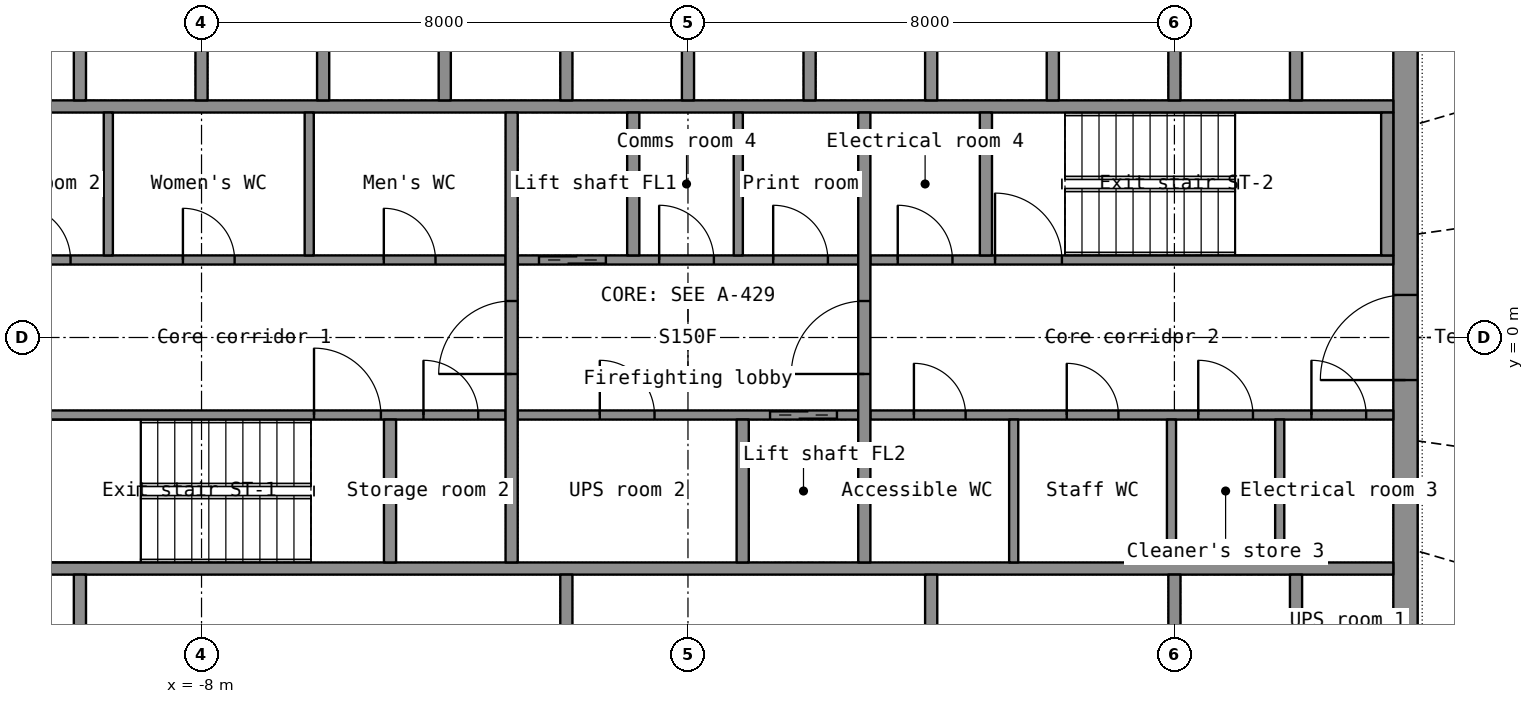
"""IFC4 building model, lengths in metres.
Left out: names, types, materials, properties, quantities, classifications, styles, units other than length and angle.
Written with IfcOpenShell. Run it as: python <this file> out.ifc"""

import sys

from ifc_helpers import new_model, si_unit, direction, frame, frame_2d, origin, place, context, subcontext, project, spatial, rectangle, extrude, element, fill, save


model = new_model("IFC4")
c1 = context("Model", 3, precision=1e-05, world=origin(), true_north=direction((0.0, 1.0)))
c2 = subcontext(c1, "Body", "Model", "MODEL_VIEW")
j1 = project(units=[si_unit("LENGTHUNIT", "METRE"), si_unit("PLANEANGLEUNIT", "RADIAN")], contexts=[c1])
p1 = place(None, origin())
s1 = spatial("IfcSite", under=j1, at=p1, CompositionType="ELEMENT")
p2 = place(p1, origin())
s2 = spatial("IfcBuilding", under=s1, at=p2, CompositionType="ELEMENT")
p3 = place(p2, frame((0.0, 0.0, 224.5)))
s3 = spatial("IfcBuildingStorey", under=s2, at=p3, CompositionType="ELEMENT", Elevation=224.5)
p4 = place(p3, frame((11.8, -7.2, 0.0), z_axis=(0.0, 0.0, 1.0), x_axis=(0.0, 1.0, 0.0)))
e1 = element("IfcWall", 1, at=p4, inside=s3, PredefinedType="SHEAR", context=c2, shape_type="SweptSolid", body=[
    extrude(rectangle(XDim=14.4, YDim=0.4, at=frame_2d((7.2, 0.0))), origin(), (0.0, 0.0, 1.0), 3.3),
])
p5 = place(p4, frame((6.5, 0.0, 0.0)))
e2 = element("IfcOpeningElement", 2, at=p5, cuts=e1, PredefinedType="OPENING", context=c2, shape_type="SweptSolid", body=[
    extrude(rectangle(XDim=1.4, YDim=2.2, at=frame_2d((0.7, 1.1))), frame((0.0, 0.21, 0.0), z_axis=(0.0, -1.0, 0.0), x_axis=(1.0, 0.0, 0.0)), (0.0, 0.0, 1.0), 0.42),
])
for number, where, z_axis, x_axis in (
    (3, (-11.6, -3.8, 0.0), (0.0, 0.0, 1.0), (1.0, 0.0, 0.0)),
    (4, (-11.6, 3.8, 0.0), (0.0, 0.0, 1.0), (1.0, 0.0, 0.0)),
):
    element("IfcWall", number, at=place(p3, frame(where, z_axis=z_axis, x_axis=x_axis)), inside=s3, PredefinedType="SHEAR", context=c2, shape_type="SweptSolid", body=[
        extrude(rectangle(XDim=23.2, YDim=0.2, at=frame_2d((11.6, 0.0))), origin(), (0.0, 0.0, 1.0), 3.3),
    ])
for number, where, z_axis, x_axis in (
    (5, (-10.0, -6.8, 0.0), (0.0, 0.0, 1.0), (0.0, 1.0, 0.0)),
    (6, (8.0, -6.8, 0.0), (0.0, 0.0, 1.0), (0.0, 1.0, 0.0)),
    (7, (10.0, -6.8, 0.0), (0.0, 0.0, 1.0), (0.0, 1.0, 0.0)),
):
    element("IfcWall", number, at=place(p3, frame(where, z_axis=z_axis, x_axis=x_axis)), inside=s3, PredefinedType="SHEAR", context=c2, shape_type="SweptSolid", body=[
        extrude(rectangle(XDim=2.9, YDim=0.2, at=frame_2d((1.45, 0.0))), origin(), (0.0, 0.0, 1.0), 3.3),
    ])
for number, where, z_axis, x_axis in (
    (8, (-2.0, -6.8, 0.0), (0.0, 0.0, 1.0), (0.0, 1.0, 0.0)),
    (9, (4.0, -6.8, 0.0), (0.0, 0.0, 1.0), (0.0, 1.0, 0.0)),
):
    element("IfcWall", number, at=place(p3, frame(where, z_axis=z_axis, x_axis=x_axis)), inside=s3, PredefinedType="PARTITIONING", context=c2, shape_type="SweptSolid", body=[
        extrude(rectangle(XDim=2.9, YDim=0.2, at=frame_2d((1.45, 0.0))), origin(), (0.0, 0.0, 1.0), 3.3),
    ])
for number, where, z_axis, x_axis in (
    (10, (-10.0, 3.9, 0.0), (0.0, 0.0, 1.0), (0.0, 1.0, 0.0)),
    (11, (-8.0, 3.9, 0.0), (0.0, 0.0, 1.0), (0.0, 1.0, 0.0)),
    (12, (-6.0, 3.9, 0.0), (0.0, 0.0, 1.0), (0.0, 1.0, 0.0)),
    (13, (-4.0, 3.9, 0.0), (0.0, 0.0, 1.0), (0.0, 1.0, 0.0)),
    (14, (-2.0, 3.9, 0.0), (0.0, 0.0, 1.0), (0.0, 1.0, 0.0)),
    (15, (0.0, 3.9, 0.0), (0.0, 0.0, 1.0), (0.0, 1.0, 0.0)),
    (16, (2.0, 3.9, 0.0), (0.0, 0.0, 1.0), (0.0, 1.0, 0.0)),
    (17, (4.0, 3.9, 0.0), (0.0, 0.0, 1.0), (0.0, 1.0, 0.0)),
    (18, (6.0, 3.9, 0.0), (0.0, 0.0, 1.0), (0.0, 1.0, 0.0)),
    (19, (8.0, 3.9, 0.0), (0.0, 0.0, 1.0), (0.0, 1.0, 0.0)),
    (20, (10.0, 3.9, 0.0), (0.0, 0.0, 1.0), (0.0, 1.0, 0.0)),
):
    element("IfcWall", number, at=place(p3, frame(where, z_axis=z_axis, x_axis=x_axis)), inside=s3, PredefinedType="SHEAR", context=c2, shape_type="SweptSolid", body=[
        extrude(rectangle(XDim=2.9, YDim=0.2, at=frame_2d((1.45, 0.0))), origin(), (0.0, 0.0, 1.0), 3.3),
    ])
p6 = place(p3, frame((-11.6, -1.275, 0.0), z_axis=(0.0, 0.0, 1.0), x_axis=(1.0, 0.0, 0.0)))
e21 = element("IfcWall", 21, at=p6, inside=s3, PredefinedType="SHEAR", context=c2, shape_type="SweptSolid", body=[
    extrude(rectangle(XDim=8.6, YDim=0.15, at=frame_2d((4.3, 0.0))), origin(), (0.0, 0.0, 1.0), 3.3),
])
p7 = place(p6, frame((5.45, 0.0, 0.0)))
e22 = element("IfcOpeningElement", 22, at=p7, cuts=e21, PredefinedType="OPENING", context=c2, shape_type="SweptSolid", body=[
    extrude(rectangle(XDim=1.1, YDim=2.15, at=frame_2d((0.55, 1.075))), frame((0.0, 0.085, 0.0), z_axis=(0.0, -1.0, 0.0), x_axis=(1.0, 0.0, 0.0)), (0.0, 0.0, 1.0), 0.17),
])
p8 = place(p6, frame((7.25, 0.0, 0.0)))
e23 = element("IfcOpeningElement", 23, at=p8, cuts=e21, PredefinedType="OPENING", context=c2, shape_type="SweptSolid", body=[
    extrude(rectangle(XDim=0.9, YDim=2.1, at=frame_2d((0.45, 1.05))), frame((0.0, 0.085, 0.0), z_axis=(0.0, -1.0, 0.0), x_axis=(1.0, 0.0, 0.0)), (0.0, 0.0, 1.0), 0.17),
])
p9 = place(p3, frame((-2.8, -1.275, 0.0), z_axis=(0.0, 0.0, 1.0), x_axis=(1.0, 0.0, 0.0)))
e24 = element("IfcWall", 24, at=p9, inside=s3, PredefinedType="SHEAR", context=c2, shape_type="SweptSolid", body=[
    extrude(rectangle(XDim=5.6, YDim=0.15, at=frame_2d((2.8, 0.0))), origin(), (0.0, 0.0, 1.0), 3.3),
])
p10 = place(p9, frame((4.15, 0.0, 0.0)))
e25 = element("IfcOpeningElement", 25, at=p10, cuts=e24, PredefinedType="OPENING", context=c2, shape_type="SweptSolid", body=[
    extrude(rectangle(XDim=1.1, YDim=2.2, at=frame_2d((0.55, 1.1))), frame((0.0, 0.085, 0.0), z_axis=(0.0, -1.0, 0.0), x_axis=(1.0, 0.0, 0.0)), (0.0, 0.0, 1.0), 0.17),
])
p11 = place(p9, frame((1.35, 0.0, 0.0)))
e26 = element("IfcOpeningElement", 26, at=p11, cuts=e24, PredefinedType="OPENING", context=c2, shape_type="SweptSolid", body=[
    extrude(rectangle(XDim=0.9, YDim=2.1, at=frame_2d((0.45, 1.05))), frame((0.0, 0.085, 0.0), z_axis=(0.0, -1.0, 0.0), x_axis=(1.0, 0.0, 0.0)), (0.0, 0.0, 1.0), 0.17),
])
p12 = place(p3, frame((3.0, -1.275, 0.0), z_axis=(0.0, 0.0, 1.0), x_axis=(1.0, 0.0, 0.0)))
e27 = element("IfcWall", 27, at=p12, inside=s3, PredefinedType="PARTITIONING", context=c2, shape_type="SweptSolid", body=[
    extrude(rectangle(XDim=8.6, YDim=0.15, at=frame_2d((4.3, 0.0))), origin(), (0.0, 0.0, 1.0), 3.3),
])
p13 = place(p12, frame((0.716, 0.0, 0.0)))
e28 = element("IfcOpeningElement", 28, at=p13, cuts=e27, PredefinedType="OPENING", context=c2, shape_type="SweptSolid", body=[
    extrude(rectangle(XDim=0.85, YDim=2.1, at=frame_2d((0.425, 1.05))), frame((0.0, 0.085, 0.0), z_axis=(0.0, -1.0, 0.0), x_axis=(1.0, 0.0, 0.0)), (0.0, 0.0, 1.0), 0.17),
])
p14 = place(p12, frame((3.229, 0.0, 0.0)))
e29 = element("IfcOpeningElement", 29, at=p14, cuts=e27, PredefinedType="OPENING", context=c2, shape_type="SweptSolid", body=[
    extrude(rectangle(XDim=0.85, YDim=2.1, at=frame_2d((0.425, 1.05))), frame((0.0, 0.085, 0.0), z_axis=(0.0, -1.0, 0.0), x_axis=(1.0, 0.0, 0.0)), (0.0, 0.0, 1.0), 0.17),
])
p15 = place(p12, frame((5.392, 0.0, 0.0)))
e30 = element("IfcOpeningElement", 30, at=p15, cuts=e27, PredefinedType="OPENING", context=c2, shape_type="SweptSolid", body=[
    extrude(rectangle(XDim=0.9, YDim=2.1, at=frame_2d((0.45, 1.05))), frame((0.0, 0.085, 0.0), z_axis=(0.0, -1.0, 0.0), x_axis=(1.0, 0.0, 0.0)), (0.0, 0.0, 1.0), 0.17),
])
p16 = place(p12, frame((7.253, 0.0, 0.0)))
e31 = element("IfcOpeningElement", 31, at=p16, cuts=e27, PredefinedType="OPENING", context=c2, shape_type="SweptSolid", body=[
    extrude(rectangle(XDim=0.9, YDim=2.1, at=frame_2d((0.45, 1.05))), frame((0.0, 0.085, 0.0), z_axis=(0.0, -1.0, 0.0), x_axis=(1.0, 0.0, 0.0)), (0.0, 0.0, 1.0), 0.17),
])
p17 = place(p3, frame((-11.6, 1.275, 0.0), z_axis=(0.0, 0.0, 1.0), x_axis=(1.0, 0.0, 0.0)))
e32 = element("IfcWall", 32, at=p17, inside=s3, PredefinedType="PARTITIONING", context=c2, shape_type="SweptSolid", body=[
    extrude(rectangle(XDim=8.6, YDim=0.15, at=frame_2d((4.3, 0.0))), origin(), (0.0, 0.0, 1.0), 3.3),
])
p18 = place(p17, frame((0.546, 0.0, 0.0)))
e33 = element("IfcOpeningElement", 33, at=p18, cuts=e32, PredefinedType="OPENING", context=c2, shape_type="SweptSolid", body=[
    extrude(rectangle(XDim=0.9, YDim=2.1, at=frame_2d((0.45, 1.05))), frame((0.0, 0.085, 0.0), z_axis=(0.0, -1.0, 0.0), x_axis=(1.0, 0.0, 0.0)), (0.0, 0.0, 1.0), 0.17),
])
p19 = place(p17, frame((3.294, 0.0, 0.0)))
e34 = element("IfcOpeningElement", 34, at=p19, cuts=e32, PredefinedType="OPENING", context=c2, shape_type="SweptSolid", body=[
    extrude(rectangle(XDim=0.85, YDim=2.1, at=frame_2d((0.425, 1.05))), frame((0.0, 0.085, 0.0), z_axis=(0.0, -1.0, 0.0), x_axis=(1.0, 0.0, 0.0)), (0.0, 0.0, 1.0), 0.17),
])
p20 = place(p17, frame((6.598, 0.0, 0.0)))
e35 = element("IfcOpeningElement", 35, at=p20, cuts=e32, PredefinedType="OPENING", context=c2, shape_type="SweptSolid", body=[
    extrude(rectangle(XDim=0.85, YDim=2.1, at=frame_2d((0.425, 1.05))), frame((0.0, 0.085, 0.0), z_axis=(0.0, -1.0, 0.0), x_axis=(1.0, 0.0, 0.0)), (0.0, 0.0, 1.0), 0.17),
])
p21 = place(p3, frame((-2.8, 1.275, 0.0), z_axis=(0.0, 0.0, 1.0), x_axis=(1.0, 0.0, 0.0)))
e36 = element("IfcWall", 36, at=p21, inside=s3, PredefinedType="SHEAR", context=c2, shape_type="SweptSolid", body=[
    extrude(rectangle(XDim=5.6, YDim=0.15, at=frame_2d((2.8, 0.0))), origin(), (0.0, 0.0, 1.0), 3.3),
])
p22 = place(p21, frame((0.35, 0.0, 0.0)))
e37 = element("IfcOpeningElement", 37, at=p22, cuts=e36, PredefinedType="OPENING", context=c2, shape_type="SweptSolid", body=[
    extrude(rectangle(XDim=1.1, YDim=2.2, at=frame_2d((0.55, 1.1))), frame((0.0, 0.085, 0.0), z_axis=(0.0, -1.0, 0.0), x_axis=(1.0, 0.0, 0.0)), (0.0, 0.0, 1.0), 0.17),
])
p23 = place(p21, frame((2.326, 0.0, 0.0)))
e38 = element("IfcOpeningElement", 38, at=p23, cuts=e36, PredefinedType="OPENING", context=c2, shape_type="SweptSolid", body=[
    extrude(rectangle(XDim=0.9, YDim=2.1, at=frame_2d((0.45, 1.05))), frame((0.0, 0.085, 0.0), z_axis=(0.0, -1.0, 0.0), x_axis=(1.0, 0.0, 0.0)), (0.0, 0.0, 1.0), 0.17),
])
p24 = place(p21, frame((4.201, 0.0, 0.0)))
e39 = element("IfcOpeningElement", 39, at=p24, cuts=e36, PredefinedType="OPENING", context=c2, shape_type="SweptSolid", body=[
    extrude(rectangle(XDim=0.9, YDim=2.1, at=frame_2d((0.45, 1.05))), frame((0.0, 0.085, 0.0), z_axis=(0.0, -1.0, 0.0), x_axis=(1.0, 0.0, 0.0)), (0.0, 0.0, 1.0), 0.17),
])
p25 = place(p3, frame((3.0, 1.275, 0.0), z_axis=(0.0, 0.0, 1.0), x_axis=(1.0, 0.0, 0.0)))
e40 = element("IfcWall", 40, at=p25, inside=s3, PredefinedType="SHEAR", context=c2, shape_type="SweptSolid", body=[
    extrude(rectangle(XDim=8.6, YDim=0.15, at=frame_2d((4.3, 0.0))), origin(), (0.0, 0.0, 1.0), 3.3),
])
p26 = place(p25, frame((2.05, 0.0, 0.0)))
e41 = element("IfcOpeningElement", 41, at=p26, cuts=e40, PredefinedType="OPENING", context=c2, shape_type="SweptSolid", body=[
    extrude(rectangle(XDim=1.1, YDim=2.15, at=frame_2d((0.55, 1.075))), frame((0.0, 0.085, 0.0), z_axis=(0.0, -1.0, 0.0), x_axis=(1.0, 0.0, 0.0)), (0.0, 0.0, 1.0), 0.17),
])
p27 = place(p25, frame((0.45, 0.0, 0.0)))
e42 = element("IfcOpeningElement", 42, at=p27, cuts=e40, PredefinedType="OPENING", context=c2, shape_type="SweptSolid", body=[
    extrude(rectangle(XDim=0.9, YDim=2.1, at=frame_2d((0.45, 1.05))), frame((0.0, 0.085, 0.0), z_axis=(0.0, -1.0, 0.0), x_axis=(1.0, 0.0, 0.0)), (0.0, 0.0, 1.0), 0.17),
])
p28 = place(p3, frame((-2.9, -3.7, 0.0), z_axis=(0.0, 0.0, 1.0), x_axis=(0.0, 1.0, 0.0)))
e43 = element("IfcWall", 43, at=p28, inside=s3, PredefinedType="SHEAR", context=c2, shape_type="SweptSolid", body=[
    extrude(rectangle(XDim=7.4, YDim=0.2, at=frame_2d((3.7, 0.0))), origin(), (0.0, 0.0, 1.0), 3.3),
])
p29 = place(p28, frame((3.1, 0.0, 0.0)))
e44 = element("IfcOpeningElement", 44, at=p29, cuts=e43, PredefinedType="OPENING", context=c2, shape_type="SweptSolid", body=[
    extrude(rectangle(XDim=1.2, YDim=2.2, at=frame_2d((0.6, 1.1))), frame((0.0, 0.11, 0.0), z_axis=(0.0, -1.0, 0.0), x_axis=(1.0, 0.0, 0.0)), (0.0, 0.0, 1.0), 0.22),
])
p30 = place(p3, frame((2.9, -3.7, 0.0), z_axis=(0.0, 0.0, 1.0), x_axis=(0.0, 1.0, 0.0)))
e45 = element("IfcWall", 45, at=p30, inside=s3, PredefinedType="SHEAR", context=c2, shape_type="SweptSolid", body=[
    extrude(rectangle(XDim=7.4, YDim=0.2, at=frame_2d((3.7, 0.0))), origin(), (0.0, 0.0, 1.0), 3.3),
])
p31 = place(p30, frame((3.1, 0.0, 0.0)))
e46 = element("IfcOpeningElement", 46, at=p31, cuts=e45, PredefinedType="OPENING", context=c2, shape_type="SweptSolid", body=[
    extrude(rectangle(XDim=1.2, YDim=2.2, at=frame_2d((0.6, 1.1))), frame((0.0, 0.11, 0.0), z_axis=(0.0, -1.0, 0.0), x_axis=(1.0, 0.0, 0.0)), (0.0, 0.0, 1.0), 0.22),
])
for number, where, z_axis, x_axis in (
    (47, (-0.9, 1.35, 0.0), (0.0, 0.0, 1.0), (0.0, 1.0, 0.0)),
    (48, (0.9, -3.7, 0.0), (0.0, 0.0, 1.0), (0.0, 1.0, 0.0)),
    (49, (11.5, 1.35, 0.0), (0.0, 0.0, 1.0), (0.0, 1.0, 0.0)),
    (50, (-4.9, -3.7, 0.0), (0.0, 0.0, 1.0), (0.0, 1.0, 0.0)),
    (51, (4.9, 1.35, 0.0), (0.0, 0.0, 1.0), (0.0, 1.0, 0.0)),
):
    element("IfcWall", number, at=place(p3, frame(where, z_axis=z_axis, x_axis=x_axis)), inside=s3, PredefinedType="SHEAR", context=c2, shape_type="SweptSolid", body=[
        extrude(rectangle(XDim=2.35, YDim=0.2, at=frame_2d((1.175, 0.0))), origin(), (0.0, 0.0, 1.0), 3.3),
    ])
for number, where, z_axis, x_axis in (
    (52, (-9.533, 1.35, 0.0), (0.0, 0.0, 1.0), (0.0, 1.0, 0.0)),
    (53, (-6.229, 1.35, 0.0), (0.0, 0.0, 1.0), (0.0, 1.0, 0.0)),
    (54, (5.357, -3.7, 0.0), (0.0, 0.0, 1.0), (0.0, 1.0, 0.0)),
    (55, (7.952, -3.7, 0.0), (0.0, 0.0, 1.0), (0.0, 1.0, 0.0)),
    (56, (9.732, -3.7, 0.0), (0.0, 0.0, 1.0), (0.0, 1.0, 0.0)),
    (57, (0.827, 1.35, 0.0), (0.0, 0.0, 1.0), (0.0, 1.0, 0.0)),
):
    element("IfcWall", number, at=place(p3, frame(where, z_axis=z_axis, x_axis=x_axis)), inside=s3, PredefinedType="PARTITIONING", context=c2, shape_type="SweptSolid", body=[
        extrude(rectangle(XDim=2.35, YDim=0.15, at=frame_2d((1.175, 0.0))), origin(), (0.0, 0.0, 1.0), 3.3),
    ])
p32 = place(p5, origin())
e58 = element("IfcDoor", 58, at=p32, inside=s3, OperationType="DOUBLE_DOOR_SINGLE_SWING", PredefinedType="DOOR", context=c2, shape_type="SweptSolid", body=[
    extrude(rectangle(XDim=1.4, YDim=2.2, at=frame_2d((0.7, 1.1))), frame((0.0, 0.025, 0.0), z_axis=(0.0, -1.0, 0.0), x_axis=(1.0, 0.0, 0.0)), (0.0, 0.0, 1.0), 0.05),
])
fill(e2, e58)
p33 = place(p29, origin())
e59 = element("IfcDoor", 59, at=p33, inside=s3, OperationType="SINGLE_SWING_LEFT", PredefinedType="DOOR", context=c2, shape_type="SweptSolid", body=[
    extrude(rectangle(XDim=1.2, YDim=2.2, at=frame_2d((0.6, 1.1))), frame((0.0, 0.025, 0.0), z_axis=(0.0, -1.0, 0.0), x_axis=(1.0, 0.0, 0.0)), (0.0, 0.0, 1.0), 0.05),
])
fill(e44, e59)
p34 = place(p31, origin())
e60 = element("IfcDoor", 60, at=p34, inside=s3, OperationType="SINGLE_SWING_LEFT", PredefinedType="DOOR", context=c2, shape_type="SweptSolid", body=[
    extrude(rectangle(XDim=1.2, YDim=2.2, at=frame_2d((0.6, 1.1))), frame((0.0, 0.025, 0.0), z_axis=(0.0, -1.0, 0.0), x_axis=(1.0, 0.0, 0.0)), (0.0, 0.0, 1.0), 0.05),
])
fill(e46, e60)
p35 = place(p22, origin())
e61 = element("IfcDoor", 61, at=p35, inside=s3, OperationType="DOUBLE_DOOR_SLIDING", PredefinedType="DOOR", context=c2, shape_type="SweptSolid", body=[
    extrude(rectangle(XDim=1.1, YDim=2.2, at=frame_2d((0.55, 1.1))), frame((0.0, 0.025, 0.0), z_axis=(0.0, -1.0, 0.0), x_axis=(1.0, 0.0, 0.0)), (0.0, 0.0, 1.0), 0.05),
])
fill(e37, e61)
p36 = place(p10, origin())
e62 = element("IfcDoor", 62, at=p36, inside=s3, OperationType="DOUBLE_DOOR_SLIDING", PredefinedType="DOOR", context=c2, shape_type="SweptSolid", body=[
    extrude(rectangle(XDim=1.1, YDim=2.2, at=frame_2d((0.55, 1.1))), frame((0.0, 0.025, 0.0), z_axis=(0.0, -1.0, 0.0), x_axis=(1.0, 0.0, 0.0)), (0.0, 0.0, 1.0), 0.05),
])
fill(e25, e62)
p37 = place(p7, origin())
e63 = element("IfcDoor", 63, at=p37, inside=s3, OperationType="SINGLE_SWING_LEFT", PredefinedType="DOOR", context=c2, shape_type="SweptSolid", body=[
    extrude(rectangle(XDim=1.1, YDim=2.15, at=frame_2d((0.55, 1.075))), frame((0.0, 0.025, 0.0), z_axis=(0.0, -1.0, 0.0), x_axis=(1.0, 0.0, 0.0)), (0.0, 0.0, 1.0), 0.05),
])
fill(e22, e63)
p38 = place(p26, origin())
e64 = element("IfcDoor", 64, at=p38, inside=s3, OperationType="SINGLE_SWING_LEFT", PredefinedType="DOOR", context=c2, shape_type="SweptSolid", body=[
    extrude(rectangle(XDim=1.1, YDim=2.15, at=frame_2d((0.55, 1.075))), frame((0.0, 0.025, 0.0), z_axis=(0.0, -1.0, 0.0), x_axis=(1.0, 0.0, 0.0)), (0.0, 0.0, 1.0), 0.05),
])
fill(e41, e64)
p39 = place(p18, origin())
e65 = element("IfcDoor", 65, at=p39, inside=s3, OperationType="SINGLE_SWING_LEFT", PredefinedType="DOOR", context=c2, shape_type="SweptSolid", body=[
    extrude(rectangle(XDim=0.9, YDim=2.1, at=frame_2d((0.45, 1.05))), frame((0.0, 0.025, 0.0), z_axis=(0.0, -1.0, 0.0), x_axis=(1.0, 0.0, 0.0)), (0.0, 0.0, 1.0), 0.05),
])
fill(e33, e65)
p40 = place(p19, origin())
e66 = element("IfcDoor", 66, at=p40, inside=s3, OperationType="SINGLE_SWING_LEFT", PredefinedType="DOOR", context=c2, shape_type="SweptSolid", body=[
    extrude(rectangle(XDim=0.85, YDim=2.1, at=frame_2d((0.425, 1.05))), frame((0.0, 0.025, 0.0), z_axis=(0.0, -1.0, 0.0), x_axis=(1.0, 0.0, 0.0)), (0.0, 0.0, 1.0), 0.05),
])
fill(e34, e66)
p41 = place(p20, origin())
e67 = element("IfcDoor", 67, at=p41, inside=s3, OperationType="SINGLE_SWING_LEFT", PredefinedType="DOOR", context=c2, shape_type="SweptSolid", body=[
    extrude(rectangle(XDim=0.85, YDim=2.1, at=frame_2d((0.425, 1.05))), frame((0.0, 0.025, 0.0), z_axis=(0.0, -1.0, 0.0), x_axis=(1.0, 0.0, 0.0)), (0.0, 0.0, 1.0), 0.05),
])
fill(e35, e67)
p42 = place(p13, origin())
e68 = element("IfcDoor", 68, at=p42, inside=s3, OperationType="SINGLE_SWING_LEFT", PredefinedType="DOOR", context=c2, shape_type="SweptSolid", body=[
    extrude(rectangle(XDim=0.85, YDim=2.1, at=frame_2d((0.425, 1.05))), frame((0.0, 0.025, 0.0), z_axis=(0.0, -1.0, 0.0), x_axis=(1.0, 0.0, 0.0)), (0.0, 0.0, 1.0), 0.05),
])
fill(e28, e68)
p43 = place(p14, origin())
e69 = element("IfcDoor", 69, at=p43, inside=s3, OperationType="SINGLE_SWING_LEFT", PredefinedType="DOOR", context=c2, shape_type="SweptSolid", body=[
    extrude(rectangle(XDim=0.85, YDim=2.1, at=frame_2d((0.425, 1.05))), frame((0.0, 0.025, 0.0), z_axis=(0.0, -1.0, 0.0), x_axis=(1.0, 0.0, 0.0)), (0.0, 0.0, 1.0), 0.05),
])
fill(e29, e69)
p44 = place(p15, origin())
e70 = element("IfcDoor", 70, at=p44, inside=s3, OperationType="SINGLE_SWING_LEFT", PredefinedType="DOOR", context=c2, shape_type="SweptSolid", body=[
    extrude(rectangle(XDim=0.9, YDim=2.1, at=frame_2d((0.45, 1.05))), frame((0.0, 0.025, 0.0), z_axis=(0.0, -1.0, 0.0), x_axis=(1.0, 0.0, 0.0)), (0.0, 0.0, 1.0), 0.05),
])
fill(e30, e70)
p45 = place(p16, origin())
e71 = element("IfcDoor", 71, at=p45, inside=s3, OperationType="SINGLE_SWING_LEFT", PredefinedType="DOOR", context=c2, shape_type="SweptSolid", body=[
    extrude(rectangle(XDim=0.9, YDim=2.1, at=frame_2d((0.45, 1.05))), frame((0.0, 0.025, 0.0), z_axis=(0.0, -1.0, 0.0), x_axis=(1.0, 0.0, 0.0)), (0.0, 0.0, 1.0), 0.05),
])
fill(e31, e71)
p46 = place(p23, origin())
e72 = element("IfcDoor", 72, at=p46, inside=s3, OperationType="SINGLE_SWING_LEFT", PredefinedType="DOOR", context=c2, shape_type="SweptSolid", body=[
    extrude(rectangle(XDim=0.9, YDim=2.1, at=frame_2d((0.45, 1.05))), frame((0.0, 0.025, 0.0), z_axis=(0.0, -1.0, 0.0), x_axis=(1.0, 0.0, 0.0)), (0.0, 0.0, 1.0), 0.05),
])
fill(e38, e72)
p47 = place(p24, origin())
e73 = element("IfcDoor", 73, at=p47, inside=s3, OperationType="SINGLE_SWING_LEFT", PredefinedType="DOOR", context=c2, shape_type="SweptSolid", body=[
    extrude(rectangle(XDim=0.9, YDim=2.1, at=frame_2d((0.45, 1.05))), frame((0.0, 0.025, 0.0), z_axis=(0.0, -1.0, 0.0), x_axis=(1.0, 0.0, 0.0)), (0.0, 0.0, 1.0), 0.05),
])
fill(e39, e73)
p48 = place(p11, origin())
e74 = element("IfcDoor", 74, at=p48, inside=s3, OperationType="SINGLE_SWING_LEFT", PredefinedType="DOOR", context=c2, shape_type="SweptSolid", body=[
    extrude(rectangle(XDim=0.9, YDim=2.1, at=frame_2d((0.45, 1.05))), frame((0.0, 0.025, 0.0), z_axis=(0.0, -1.0, 0.0), x_axis=(1.0, 0.0, 0.0)), (0.0, 0.0, 1.0), 0.05),
])
fill(e26, e74)
p49 = place(p27, origin())
e75 = element("IfcDoor", 75, at=p49, inside=s3, OperationType="SINGLE_SWING_LEFT", PredefinedType="DOOR", context=c2, shape_type="SweptSolid", body=[
    extrude(rectangle(XDim=0.9, YDim=2.1, at=frame_2d((0.45, 1.05))), frame((0.0, 0.025, 0.0), z_axis=(0.0, -1.0, 0.0), x_axis=(1.0, 0.0, 0.0)), (0.0, 0.0, 1.0), 0.05),
])
fill(e42, e75)
p50 = place(p8, origin())
e76 = element("IfcDoor", 76, at=p50, inside=s3, OperationType="SINGLE_SWING_LEFT", PredefinedType="DOOR", context=c2, shape_type="SweptSolid", body=[
    extrude(rectangle(XDim=0.9, YDim=2.1, at=frame_2d((0.45, 1.05))), frame((0.0, 0.025, 0.0), z_axis=(0.0, -1.0, 0.0), x_axis=(1.0, 0.0, 0.0)), (0.0, 0.0, 1.0), 0.05),
])
fill(e23, e76)
save(model, sys.argv[1])
